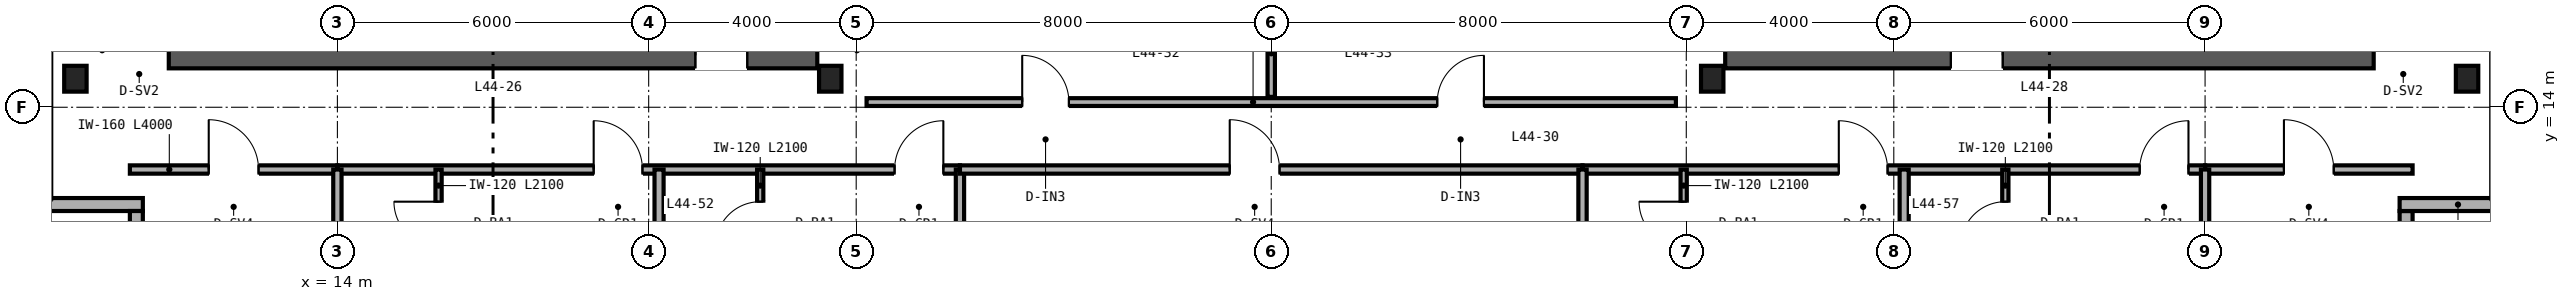
"""IFC4 building model, lengths in metres.
Left out: names, types, materials, properties, quantities, classifications, styles, units other than length and angle.
Written with IfcOpenShell. Run it as: python <this file> out.ifc"""

import sys

from ifc_helpers import new_model, si_unit, direction, frame, frame_2d, origin, origin_2d, place, context, subcontext, project, spatial, rectangle, i_section, extrude, source, transform, mapped, element, fill, save


model = new_model("IFC4")
c1 = context("Model", 3, precision=1e-05, world=origin(), true_north=direction((0.0, 1.0)))
c2 = subcontext(c1, "Body", "Model", "MODEL_VIEW")
j1 = project(units=[si_unit("LENGTHUNIT", "METRE"), si_unit("PLANEANGLEUNIT", "RADIAN")], contexts=[c1])
p1 = place(None, origin())
s1 = spatial("IfcSite", under=j1, at=p1, CompositionType="ELEMENT")
p2 = place(p1, origin())
s2 = spatial("IfcBuilding", under=s1, at=p2, CompositionType="ELEMENT")
p3 = place(p2, frame((0.0, 0.0, 177.6)))
s3 = spatial("IfcBuildingStorey", under=s2, at=p3, CompositionType="ELEMENT", Elevation=177.6)
p4 = place(p3, frame((10.75, 15.0, 0.0), z_axis=(0.0, 0.0, 1.0), x_axis=(1.0, 0.0, 0.0)))
e1 = element("IfcWall", 1, at=p4, inside=s3, PredefinedType="SHEAR", context=c2, shape_type="SweptSolid", body=[
    extrude(rectangle(XDim=12.5, YDim=0.5, at=frame_2d((6.25, 0.0))), origin(), (0.0, 0.0, 1.0), 3.37),
])
p5 = place(p4, frame((10.15, 0.0, 0.0)))
e2 = element("IfcOpeningElement", 2, at=p5, cuts=e1, PredefinedType="OPENING", context=c2, shape_type="SweptSolid", body=[
    extrude(rectangle(XDim=1.0, YDim=2.15, at=frame_2d((0.5, 1.075))), frame((0.0, 0.26, 0.0), z_axis=(0.0, -1.0, 0.0), x_axis=(1.0, 0.0, 0.0)), (0.0, 0.0, 1.0), 0.52),
])
p6 = place(p3, frame((40.75, 15.0, 0.0), z_axis=(0.0, 0.0, 1.0), x_axis=(1.0, 0.0, 0.0)))
e3 = element("IfcWall", 3, at=p6, inside=s3, PredefinedType="SHEAR", context=c2, shape_type="SweptSolid", body=[
    extrude(rectangle(XDim=12.5, YDim=0.5, at=frame_2d((6.25, 0.0))), origin(), (0.0, 0.0, 1.0), 3.37),
])
p7 = place(p6, frame((4.35, 0.0, 0.0)))
e4 = element("IfcOpeningElement", 4, at=p7, cuts=e3, PredefinedType="OPENING", context=c2, shape_type="SweptSolid", body=[
    extrude(rectangle(XDim=1.0, YDim=2.15, at=frame_2d((0.5, 1.075))), frame((0.0, 0.26, 0.0), z_axis=(0.0, -1.0, 0.0), x_axis=(1.0, 0.0, 0.0)), (0.0, 0.0, 1.0), 0.52),
])
m1 = source(origin(), c2, "Body", "SweptSolid", [
    extrude(i_section(OverallWidth=0.432, OverallDepth=0.498, WebThickness=0.056, FlangeThickness=0.089, FilletRadius=0.025, at=origin_2d()), origin(), (0.0, 0.0, 1.0), 3.37),
])
for number, where, z_axis, x_axis in (
    (5, (8.95, 14.55, 0.0), (0.0, 0.0, 1.0), (1.0, 0.0, 0.0)),
    (6, (23.5, 14.55, 0.0), (0.0, 0.0, 1.0), (1.0, 0.0, 0.0)),
    (7, (40.5, 14.55, 0.0), (0.0, 0.0, 1.0), (1.0, 0.0, 0.0)),
    (8, (55.05, 14.55, 0.0), (0.0, 0.0, 1.0), (1.0, 0.0, 0.0)),
):
    element("IfcColumn", number, at=place(p3, frame(where, z_axis=z_axis, x_axis=x_axis)), inside=s3, PredefinedType="COLUMN", context=c2, shape_type="MappedRepresentation", body=[
        mapped(m1, transform((0.0, 0.0, 0.0), scale=1.0)),
    ])
p8 = place(p3, frame((53.875, 10.0, 0.0), z_axis=(0.0, 0.0, 1.0), x_axis=(0.0, 1.0, 0.0)))
e9 = element("IfcWall", 9, at=p8, inside=s3, PredefinedType="SOLIDWALL", context=c2, shape_type="SweptSolid", body=[
    extrude(rectangle(XDim=2.0, YDim=0.25, at=frame_2d((1.0, 0.0))), origin(), (0.0, 0.0, 1.0), 3.37),
])
for number, where, z_axis, x_axis in (
    (10, (53.75, 12.125, 0.0), (0.0, 0.0, 1.0), (1.0, 0.0, 0.0)),
    (11, (8.0, 12.125, 0.0), (0.0, 0.0, 1.0), (1.0, 0.0, 0.0)),
):
    element("IfcWall", number, at=place(p3, frame(where, z_axis=z_axis, x_axis=x_axis)), inside=s3, PredefinedType="SOLIDWALL", context=c2, shape_type="SweptSolid", body=[
        extrude(rectangle(XDim=2.25, YDim=0.25, at=frame_2d((1.125, 0.0))), origin(), (0.0, 0.0, 1.0), 3.37),
    ])
p9 = place(p3, frame((10.125, 12.0, 0.0), z_axis=(0.0, 0.0, 1.0), x_axis=(0.0, -1.0, 0.0)))
e12 = element("IfcWall", 12, at=p9, inside=s3, PredefinedType="SOLIDWALL", context=c2, shape_type="SweptSolid", body=[
    extrude(rectangle(XDim=2.0, YDim=0.25, at=frame_2d((1.0, 0.0))), origin(), (0.0, 0.0, 1.0), 3.37),
])
p10 = place(p3, frame((24.2, 14.1, 0.0), z_axis=(0.0, 0.0, 1.0), x_axis=(1.0, 0.0, 0.0)))
e13 = element("IfcWall", 13, at=p10, inside=s3, PredefinedType="PARTITIONING", context=c2, shape_type="SweptSolid", body=[
    extrude(rectangle(XDim=15.6, YDim=0.15, at=frame_2d((7.8, 0.0))), origin(), (0.0, 0.0, 1.0), 3.37),
])
p11 = place(p10, frame((3.0, 0.0, 0.0)))
e14 = element("IfcOpeningElement", 14, at=p11, cuts=e13, PredefinedType="OPENING", context=c2, shape_type="SweptSolid", body=[
    extrude(rectangle(XDim=0.9, YDim=2.15, at=frame_2d((0.45, 1.075))), frame((0.0, 0.085, 0.0), z_axis=(0.0, -1.0, 0.0), x_axis=(1.0, 0.0, 0.0)), (0.0, 0.0, 1.0), 0.17),
])
p12 = place(p10, frame((11.0, 0.0, 0.0)))
e15 = element("IfcOpeningElement", 15, at=p12, cuts=e13, PredefinedType="OPENING", context=c2, shape_type="SweptSolid", body=[
    extrude(rectangle(XDim=0.9, YDim=2.15, at=frame_2d((0.45, 1.075))), frame((0.0, 0.085, 0.0), z_axis=(0.0, -1.0, 0.0), x_axis=(1.0, 0.0, 0.0)), (0.0, 0.0, 1.0), 0.17),
])
p13 = place(p3, frame((32.0, 14.2, 0.0), z_axis=(0.0, 0.0, 1.0), x_axis=(0.0, 1.0, 0.0)))
e16 = element("IfcWall", 16, at=p13, inside=s3, PredefinedType="PARTITIONING", context=c2, shape_type="SweptSolid", body=[
    extrude(rectangle(XDim=1.68, YDim=0.142, at=frame_2d((0.84, 0.0))), origin(), (0.0, 0.0, 1.0), 3.37),
])
p14 = place(p3, frame((10.0, 12.8, 0.0), z_axis=(0.0, 0.0, 1.0), x_axis=(1.0, 0.0, 0.0)))
e17 = element("IfcWall", 17, at=p14, inside=s3, PredefinedType="PARTITIONING", context=c2, shape_type="SweptSolid", body=[
    extrude(rectangle(XDim=4.0, YDim=0.16, at=frame_2d((2.0, 0.0))), origin(), (0.0, 0.0, 1.0), 3.37),
])
p15 = place(p14, frame((1.52, 0.0, 0.0)))
e18 = element("IfcOpeningElement", 18, at=p15, cuts=e17, PredefinedType="OPENING", context=c2, shape_type="SweptSolid", body=[
    extrude(rectangle(XDim=0.96, YDim=2.15, at=frame_2d((0.48, 1.075))), frame((0.0, 0.09, 0.0), z_axis=(0.0, -1.0, 0.0), x_axis=(1.0, 0.0, 0.0)), (0.0, 0.0, 1.0), 0.18),
])
p16 = place(p3, frame((50.0, 12.8, 0.0), z_axis=(0.0, 0.0, 1.0), x_axis=(1.0, 0.0, 0.0)))
e19 = element("IfcWall", 19, at=p16, inside=s3, PredefinedType="PARTITIONING", context=c2, shape_type="SweptSolid", body=[
    extrude(rectangle(XDim=4.0, YDim=0.16, at=frame_2d((2.0, 0.0))), origin(), (0.0, 0.0, 1.0), 3.37),
])
p17 = place(p16, frame((1.52, 0.0, 0.0)))
e20 = element("IfcOpeningElement", 20, at=p17, cuts=e19, PredefinedType="OPENING", context=c2, shape_type="SweptSolid", body=[
    extrude(rectangle(XDim=0.96, YDim=2.15, at=frame_2d((0.48, 1.075))), frame((0.0, 0.09, 0.0), z_axis=(0.0, -1.0, 0.0), x_axis=(1.0, 0.0, 0.0)), (0.0, 0.0, 1.0), 0.18),
])
p18 = place(p3, frame((14.0, 12.8, 0.0), z_axis=(0.0, 0.0, 1.0), x_axis=(1.0, 0.0, 0.0)))
e21 = element("IfcWall", 21, at=p18, inside=s3, PredefinedType="PARTITIONING", context=c2, shape_type="SweptSolid", body=[
    extrude(rectangle(XDim=12.0, YDim=0.16, at=frame_2d((6.0, 0.0))), origin(), (0.0, 0.0, 1.0), 2.913),
])
p19 = place(p18, frame((4.94, 0.0, 0.0)))
e22 = element("IfcOpeningElement", 22, at=p19, cuts=e21, PredefinedType="OPENING", context=c2, shape_type="SweptSolid", body=[
    extrude(rectangle(XDim=0.94, YDim=2.15, at=frame_2d((0.47, 1.075))), frame((0.0, 0.09, 0.0), z_axis=(0.0, -1.0, 0.0), x_axis=(1.0, 0.0, 0.0)), (0.0, 0.0, 1.0), 0.18),
])
p20 = place(p18, frame((10.74, 0.0, 0.0)))
e23 = element("IfcOpeningElement", 23, at=p20, cuts=e21, PredefinedType="OPENING", context=c2, shape_type="SweptSolid", body=[
    extrude(rectangle(XDim=0.94, YDim=2.15, at=frame_2d((0.47, 1.075))), frame((0.0, 0.09, 0.0), z_axis=(0.0, -1.0, 0.0), x_axis=(1.0, 0.0, 0.0)), (0.0, 0.0, 1.0), 0.18),
])
p21 = place(p3, frame((14.0, 6.36, 0.0), z_axis=(0.0, 0.0, 1.0), x_axis=(0.0, 1.0, 0.0)))
e24 = element("IfcWall", 24, at=p21, inside=s3, PredefinedType="PARTITIONING", context=c2, shape_type="SweptSolid", body=[
    extrude(rectangle(XDim=6.44, YDim=0.16, at=frame_2d((3.22, 0.0))), origin(), (0.0, 0.0, 1.0), 2.677),
])
p22 = place(p3, frame((26.0, 6.36, 0.0), z_axis=(0.0, 0.0, 1.0), x_axis=(0.0, 1.0, 0.0)))
e25 = element("IfcWall", 25, at=p22, inside=s3, PredefinedType="PARTITIONING", context=c2, shape_type="SweptSolid", body=[
    extrude(rectangle(XDim=6.44, YDim=0.16, at=frame_2d((3.22, 0.0))), origin(), (0.0, 0.0, 1.0), 2.443),
])
p23 = place(p3, frame((20.2, 6.36, 0.0), z_axis=(0.0, 0.0, 1.0), x_axis=(0.0, 1.0, 0.0)))
e26 = element("IfcWall", 26, at=p23, inside=s3, PredefinedType="PARTITIONING", context=c2, shape_type="SweptSolid", body=[
    extrude(rectangle(XDim=6.44, YDim=0.175, at=frame_2d((3.22, 0.0))), origin(), (0.0, 0.0, 1.0), 2.677),
])
p24 = place(p3, frame((15.95, 10.7, 0.0), z_axis=(0.0, 0.0, 1.0), x_axis=(0.0, 1.0, 0.0)))
e27 = element("IfcWall", 27, at=p24, inside=s3, PredefinedType="PARTITIONING", context=c2, shape_type="SweptSolid", body=[
    extrude(rectangle(XDim=2.1, YDim=0.12, at=frame_2d((1.05, 0.0))), origin(), (0.0, 0.0, 1.0), 3.37),
])
p25 = place(p24, frame((0.62, 0.0, 0.0)))
e28 = element("IfcOpeningElement", 28, at=p25, cuts=e27, PredefinedType="OPENING", context=c2, shape_type="SweptSolid", body=[
    extrude(rectangle(XDim=0.86, YDim=2.1, at=frame_2d((0.43, 1.05))), frame((0.0, 0.07, 0.0), z_axis=(0.0, -1.0, 0.0), x_axis=(1.0, 0.0, 0.0)), (0.0, 0.0, 1.0), 0.14),
])
p26 = place(p3, frame((22.15, 10.7, 0.0), z_axis=(0.0, 0.0, 1.0), x_axis=(0.0, 1.0, 0.0)))
e29 = element("IfcWall", 29, at=p26, inside=s3, PredefinedType="PARTITIONING", context=c2, shape_type="SweptSolid", body=[
    extrude(rectangle(XDim=2.1, YDim=0.12, at=frame_2d((1.05, 0.0))), origin(), (0.0, 0.0, 1.0), 3.37),
])
p27 = place(p26, frame((0.62, 0.0, 0.0)))
e30 = element("IfcOpeningElement", 30, at=p27, cuts=e29, PredefinedType="OPENING", context=c2, shape_type="SweptSolid", body=[
    extrude(rectangle(XDim=0.86, YDim=2.1, at=frame_2d((0.43, 1.05))), frame((0.0, 0.07, 0.0), z_axis=(0.0, -1.0, 0.0), x_axis=(1.0, 0.0, 0.0)), (0.0, 0.0, 1.0), 0.14),
])
p28 = place(p3, frame((26.0, 12.8, 0.0), z_axis=(0.0, 0.0, 1.0), x_axis=(1.0, 0.0, 0.0)))
e31 = element("IfcWall", 31, at=p28, inside=s3, PredefinedType="PARTITIONING", context=c2, shape_type="SweptSolid", body=[
    extrude(rectangle(XDim=12.0, YDim=0.16, at=frame_2d((6.0, 0.0))), origin(), (0.0, 0.0, 1.0), 3.37),
])
p29 = place(p28, frame((5.2, 0.0, 0.0)))
e32 = element("IfcOpeningElement", 32, at=p29, cuts=e31, PredefinedType="OPENING", context=c2, shape_type="SweptSolid", body=[
    extrude(rectangle(XDim=0.96, YDim=2.15, at=frame_2d((0.48, 1.075))), frame((0.0, 0.09, 0.0), z_axis=(0.0, -1.0, 0.0), x_axis=(1.0, 0.0, 0.0)), (0.0, 0.0, 1.0), 0.18),
])
p30 = place(p3, frame((38.0, 12.8, 0.0), z_axis=(0.0, 0.0, 1.0), x_axis=(1.0, 0.0, 0.0)))
e33 = element("IfcWall", 33, at=p30, inside=s3, PredefinedType="PARTITIONING", context=c2, shape_type="SweptSolid", body=[
    extrude(rectangle(XDim=12.0, YDim=0.16, at=frame_2d((6.0, 0.0))), origin(), (0.0, 0.0, 1.0), 2.913),
])
p31 = place(p30, frame((4.94, 0.0, 0.0)))
e34 = element("IfcOpeningElement", 34, at=p31, cuts=e33, PredefinedType="OPENING", context=c2, shape_type="SweptSolid", body=[
    extrude(rectangle(XDim=0.94, YDim=2.15, at=frame_2d((0.47, 1.075))), frame((0.0, 0.09, 0.0), z_axis=(0.0, -1.0, 0.0), x_axis=(1.0, 0.0, 0.0)), (0.0, 0.0, 1.0), 0.18),
])
p32 = place(p30, frame((10.74, 0.0, 0.0)))
e35 = element("IfcOpeningElement", 35, at=p32, cuts=e33, PredefinedType="OPENING", context=c2, shape_type="SweptSolid", body=[
    extrude(rectangle(XDim=0.94, YDim=2.15, at=frame_2d((0.47, 1.075))), frame((0.0, 0.09, 0.0), z_axis=(0.0, -1.0, 0.0), x_axis=(1.0, 0.0, 0.0)), (0.0, 0.0, 1.0), 0.18),
])
p33 = place(p3, frame((38.0, 6.36, 0.0), z_axis=(0.0, 0.0, 1.0), x_axis=(0.0, 1.0, 0.0)))
e36 = element("IfcWall", 36, at=p33, inside=s3, PredefinedType="PARTITIONING", context=c2, shape_type="SweptSolid", body=[
    extrude(rectangle(XDim=6.44, YDim=0.16, at=frame_2d((3.22, 0.0))), origin(), (0.0, 0.0, 1.0), 2.443),
])
p34 = place(p3, frame((50.0, 6.36, 0.0), z_axis=(0.0, 0.0, 1.0), x_axis=(0.0, 1.0, 0.0)))
e37 = element("IfcWall", 37, at=p34, inside=s3, PredefinedType="PARTITIONING", context=c2, shape_type="SweptSolid", body=[
    extrude(rectangle(XDim=6.44, YDim=0.16, at=frame_2d((3.22, 0.0))), origin(), (0.0, 0.0, 1.0), 2.677),
])
p35 = place(p3, frame((44.2, 6.36, 0.0), z_axis=(0.0, 0.0, 1.0), x_axis=(0.0, 1.0, 0.0)))
e38 = element("IfcWall", 38, at=p35, inside=s3, PredefinedType="PARTITIONING", context=c2, shape_type="SweptSolid", body=[
    extrude(rectangle(XDim=6.44, YDim=0.175, at=frame_2d((3.22, 0.0))), origin(), (0.0, 0.0, 1.0), 2.677),
])
p36 = place(p3, frame((39.95, 10.7, 0.0), z_axis=(0.0, 0.0, 1.0), x_axis=(0.0, 1.0, 0.0)))
e39 = element("IfcWall", 39, at=p36, inside=s3, PredefinedType="PARTITIONING", context=c2, shape_type="SweptSolid", body=[
    extrude(rectangle(XDim=2.1, YDim=0.12, at=frame_2d((1.05, 0.0))), origin(), (0.0, 0.0, 1.0), 3.37),
])
p37 = place(p36, frame((0.62, 0.0, 0.0)))
e40 = element("IfcOpeningElement", 40, at=p37, cuts=e39, PredefinedType="OPENING", context=c2, shape_type="SweptSolid", body=[
    extrude(rectangle(XDim=0.86, YDim=2.1, at=frame_2d((0.43, 1.05))), frame((0.0, 0.07, 0.0), z_axis=(0.0, -1.0, 0.0), x_axis=(1.0, 0.0, 0.0)), (0.0, 0.0, 1.0), 0.14),
])
p38 = place(p3, frame((46.15, 10.7, 0.0), z_axis=(0.0, 0.0, 1.0), x_axis=(0.0, 1.0, 0.0)))
e41 = element("IfcWall", 41, at=p38, inside=s3, PredefinedType="PARTITIONING", context=c2, shape_type="SweptSolid", body=[
    extrude(rectangle(XDim=2.1, YDim=0.12, at=frame_2d((1.05, 0.0))), origin(), (0.0, 0.0, 1.0), 3.37),
])
p39 = place(p38, frame((0.62, 0.0, 0.0)))
e42 = element("IfcOpeningElement", 42, at=p39, cuts=e41, PredefinedType="OPENING", context=c2, shape_type="SweptSolid", body=[
    extrude(rectangle(XDim=0.86, YDim=2.1, at=frame_2d((0.43, 1.05))), frame((0.0, 0.07, 0.0), z_axis=(0.0, -1.0, 0.0), x_axis=(1.0, 0.0, 0.0)), (0.0, 0.0, 1.0), 0.14),
])
m2 = source(origin(), c2, "Body", "SweptSolid", [
    extrude(rectangle(XDim=1.0, YDim=2.15, at=frame_2d((0.5, 1.075))), frame((0.0, 0.025, 0.0), z_axis=(0.0, -1.0, 0.0), x_axis=(1.0, 0.0, 0.0)), (0.0, 0.0, 1.0), 0.05),
])
p40 = place(p5, origin())
e43 = element("IfcDoor", 43, at=p40, inside=s3, OperationType="SINGLE_SWING_LEFT", PredefinedType="DOOR", context=c2, shape_type="MappedRepresentation", body=[
    mapped(m2, transform((0.0, 0.0, 0.0), scale=1.0)),
])
fill(e2, e43)
p41 = place(p7, origin())
e44 = element("IfcDoor", 44, at=p41, inside=s3, OperationType="SINGLE_SWING_RIGHT", PredefinedType="DOOR", context=c2, shape_type="MappedRepresentation", body=[
    mapped(m2, transform((0.0, 0.0, 0.0), scale=1.0)),
])
fill(e4, e44)
m3 = source(origin(), c2, "Body", "SweptSolid", [
    extrude(rectangle(XDim=0.9, YDim=2.15, at=frame_2d((0.45, 1.075))), frame((0.0, 0.025, 0.0), z_axis=(0.0, -1.0, 0.0), x_axis=(1.0, 0.0, 0.0)), (0.0, 0.0, 1.0), 0.05),
])
p42 = place(p11, origin())
e45 = element("IfcDoor", 45, at=p42, inside=s3, OperationType="SINGLE_SWING_LEFT", PredefinedType="DOOR", context=c2, shape_type="MappedRepresentation", body=[
    mapped(m3, transform((0.0, 0.0, 0.0), scale=1.0)),
])
fill(e14, e45)
p43 = place(p12, origin())
e46 = element("IfcDoor", 46, at=p43, inside=s3, OperationType="SINGLE_SWING_RIGHT", PredefinedType="DOOR", context=c2, shape_type="MappedRepresentation", body=[
    mapped(m3, transform((0.0, 0.0, 0.0), scale=1.0)),
])
fill(e15, e46)
m4 = source(origin(), c2, "Body", "SweptSolid", [
    extrude(rectangle(XDim=0.96, YDim=2.15, at=frame_2d((0.48, 1.075))), frame((0.0, 0.025, 0.0), z_axis=(0.0, -1.0, 0.0), x_axis=(1.0, 0.0, 0.0)), (0.0, 0.0, 1.0), 0.05),
])
p44 = place(p15, origin())
e47 = element("IfcDoor", 47, at=p44, inside=s3, OperationType="SINGLE_SWING_LEFT", PredefinedType="DOOR", context=c2, shape_type="MappedRepresentation", body=[
    mapped(m4, transform((0.0, 0.0, 0.0), scale=1.0)),
])
fill(e18, e47)
p45 = place(p17, origin())
e48 = element("IfcDoor", 48, at=p45, inside=s3, OperationType="SINGLE_SWING_LEFT", PredefinedType="DOOR", context=c2, shape_type="MappedRepresentation", body=[
    mapped(m4, transform((0.0, 0.0, 0.0), scale=1.0)),
])
fill(e20, e48)
m5 = source(origin(), c2, "Body", "SweptSolid", [
    extrude(rectangle(XDim=0.86, YDim=2.1, at=frame_2d((0.43, 1.05))), frame((0.0, 0.025, 0.0), z_axis=(0.0, -1.0, 0.0), x_axis=(1.0, 0.0, 0.0)), (0.0, 0.0, 1.0), 0.05),
])
p46 = place(p25, origin())
e49 = element("IfcDoor", 49, at=p46, inside=s3, OperationType="SINGLE_SWING_RIGHT", PredefinedType="DOOR", context=c2, shape_type="MappedRepresentation", body=[
    mapped(m5, transform((0.0, 0.0, 0.0), scale=1.0)),
])
fill(e28, e49)
p47 = place(p27, origin())
e50 = element("IfcDoor", 50, at=p47, inside=s3, OperationType="SINGLE_SWING_LEFT", PredefinedType="DOOR", context=c2, shape_type="MappedRepresentation", body=[
    mapped(m5, transform((0.0, 0.0, 0.0), scale=1.0)),
])
fill(e30, e50)
m6 = source(origin(), c2, "Body", "SweptSolid", [
    extrude(rectangle(XDim=0.94, YDim=2.15, at=frame_2d((0.47, 1.075))), frame((0.0, 0.025, 0.0), z_axis=(0.0, -1.0, 0.0), x_axis=(1.0, 0.0, 0.0)), (0.0, 0.0, 1.0), 0.05),
])
p48 = place(p19, origin())
e51 = element("IfcDoor", 51, at=p48, inside=s3, OperationType="SINGLE_SWING_LEFT", PredefinedType="DOOR", context=c2, shape_type="MappedRepresentation", body=[
    mapped(m6, transform((0.0, 0.0, 0.0), scale=1.0)),
])
fill(e22, e51)
p49 = place(p20, origin())
e52 = element("IfcDoor", 52, at=p49, inside=s3, OperationType="SINGLE_SWING_RIGHT", PredefinedType="DOOR", context=c2, shape_type="MappedRepresentation", body=[
    mapped(m6, transform((0.0, 0.0, 0.0), scale=1.0)),
])
fill(e23, e52)
p50 = place(p29, origin())
e53 = element("IfcDoor", 53, at=p50, inside=s3, OperationType="SINGLE_SWING_LEFT", PredefinedType="DOOR", context=c2, shape_type="MappedRepresentation", body=[
    mapped(m4, transform((0.0, 0.0, 0.0), scale=1.0)),
])
fill(e32, e53)
p51 = place(p37, origin())
e54 = element("IfcDoor", 54, at=p51, inside=s3, OperationType="SINGLE_SWING_RIGHT", PredefinedType="DOOR", context=c2, shape_type="MappedRepresentation", body=[
    mapped(m5, transform((0.0, 0.0, 0.0), scale=1.0)),
])
fill(e40, e54)
p52 = place(p39, origin())
e55 = element("IfcDoor", 55, at=p52, inside=s3, OperationType="SINGLE_SWING_LEFT", PredefinedType="DOOR", context=c2, shape_type="MappedRepresentation", body=[
    mapped(m5, transform((0.0, 0.0, 0.0), scale=1.0)),
])
fill(e42, e55)
p53 = place(p31, origin())
e56 = element("IfcDoor", 56, at=p53, inside=s3, OperationType="SINGLE_SWING_LEFT", PredefinedType="DOOR", context=c2, shape_type="MappedRepresentation", body=[
    mapped(m6, transform((0.0, 0.0, 0.0), scale=1.0)),
])
fill(e34, e56)
p54 = place(p32, origin())
e57 = element("IfcDoor", 57, at=p54, inside=s3, OperationType="SINGLE_SWING_RIGHT", PredefinedType="DOOR", context=c2, shape_type="MappedRepresentation", body=[
    mapped(m6, transform((0.0, 0.0, 0.0), scale=1.0)),
])
fill(e35, e57)
save(model, sys.argv[1])
